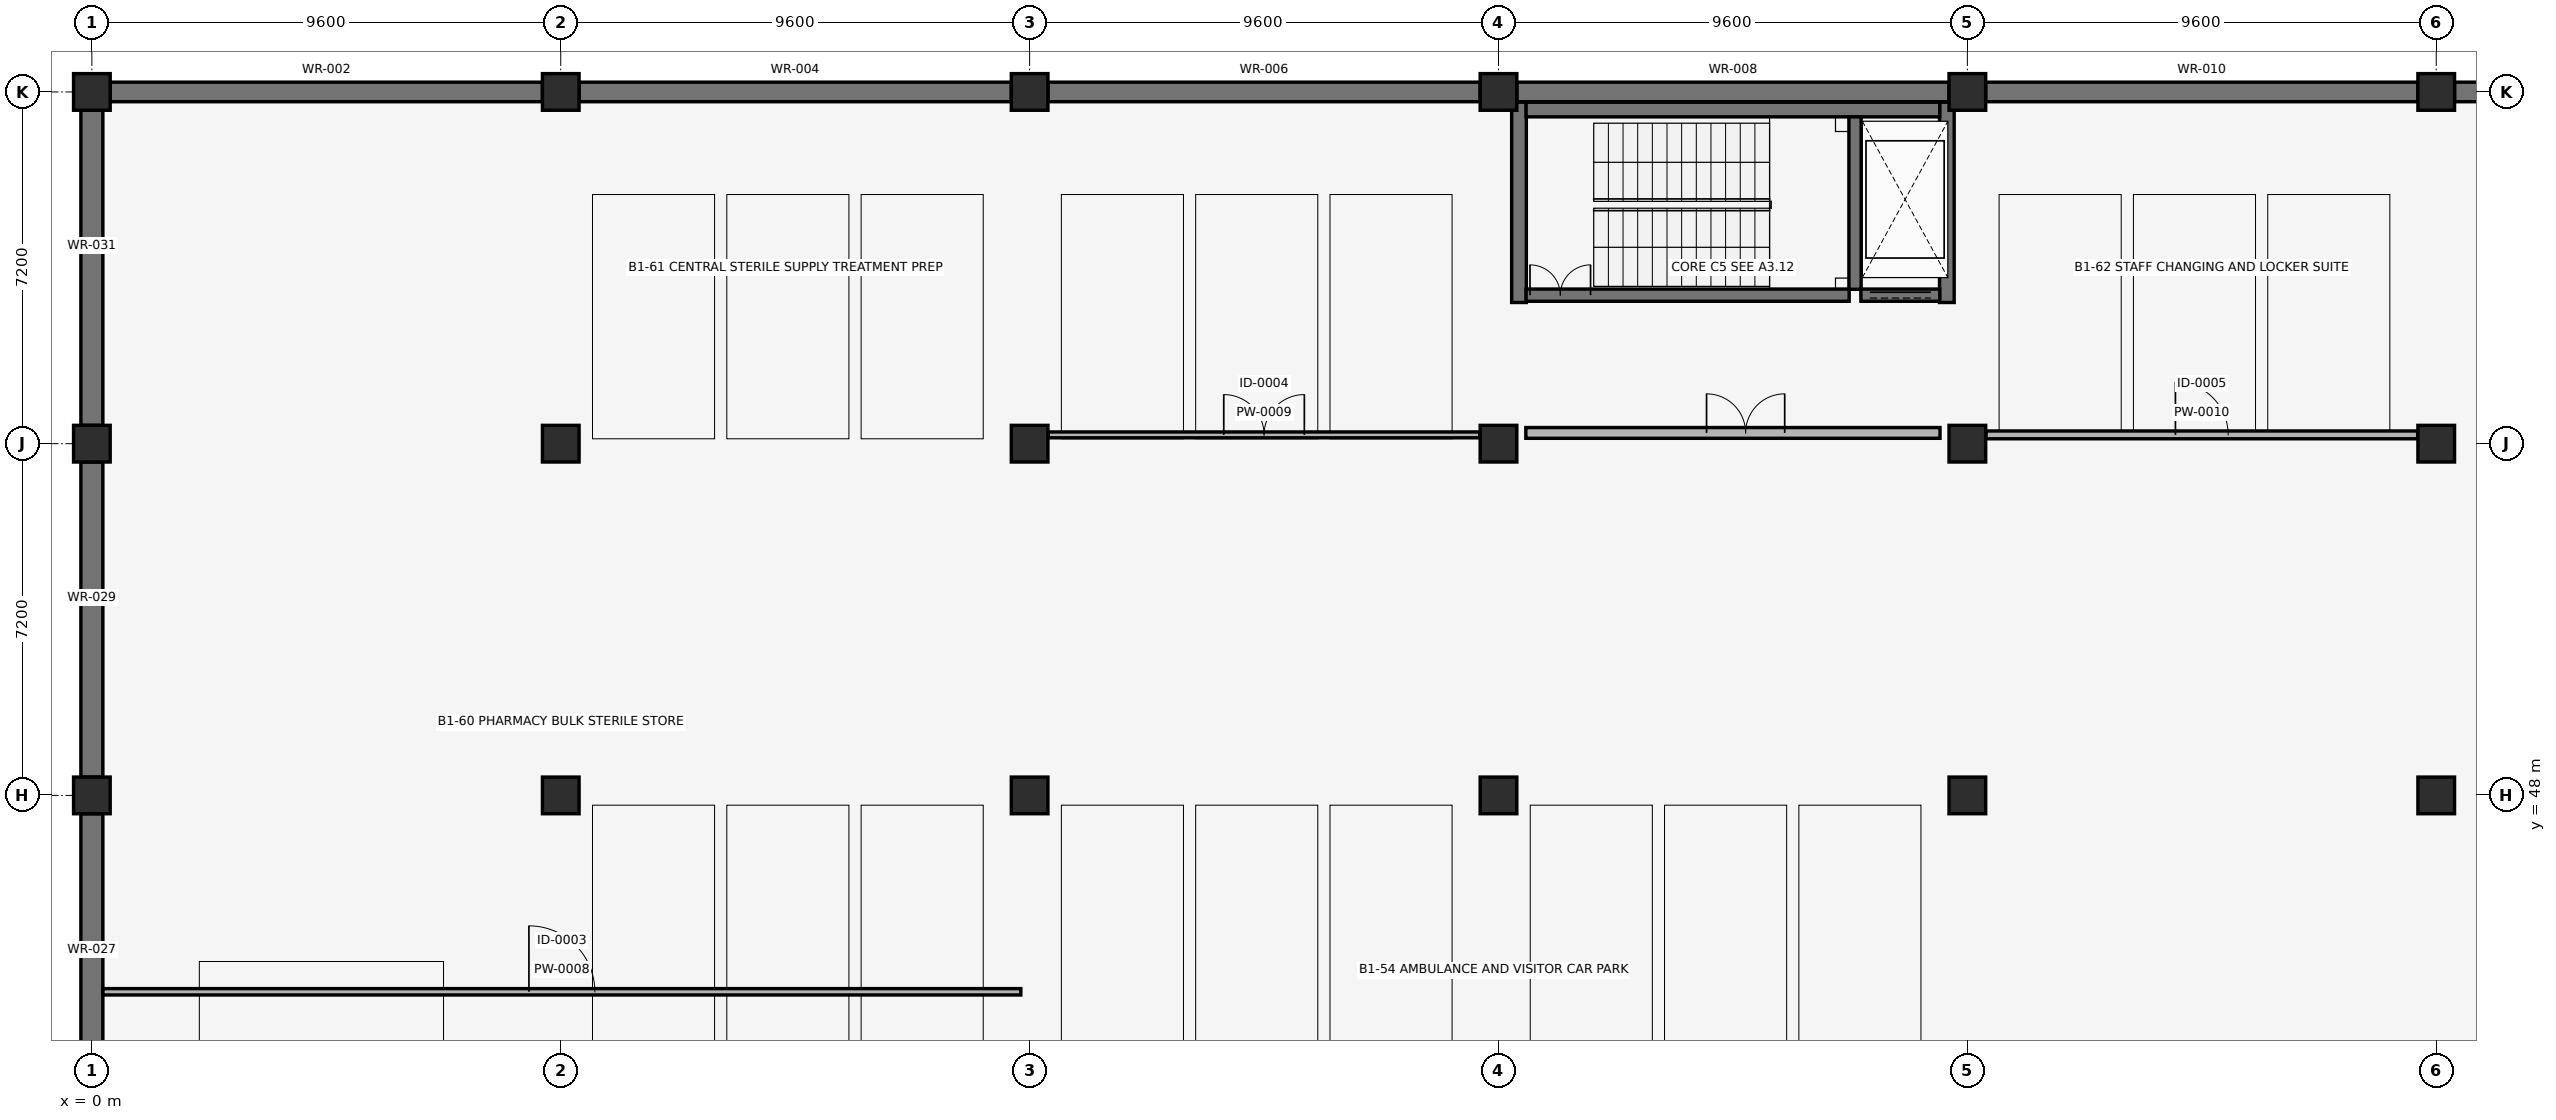
"""IFC4 building model, lengths in metres.
Left out: names, types, materials, properties, quantities, classifications, styles, units other than length and angle.
Written with IfcOpenShell. Run it as: python <this file> out.ifc"""

import sys

from ifc_helpers import new_model, si_unit, direction, frame, frame_2d, origin, origin_2d, place, context, subcontext, project, spatial, rectangle, extrude, element, fill, save


model = new_model("IFC4")
c1 = context("Model", 3, precision=1e-05, world=origin(), true_north=direction((0.0, 1.0)))
c2 = subcontext(c1, "Body", "Model", "MODEL_VIEW")
j1 = project(units=[si_unit("LENGTHUNIT", "METRE"), si_unit("PLANEANGLEUNIT", "RADIAN")], contexts=[c1])
p1 = place(None, origin())
s1 = spatial("IfcSite", under=j1, at=p1, CompositionType="ELEMENT")
p2 = place(p1, origin())
s2 = spatial("IfcBuilding", under=s1, at=p2, CompositionType="ELEMENT")
p3 = place(p2, frame((0.0, 0.0, -4.42)))
s3 = spatial("IfcBuildingStorey", under=s2, at=p3, CompositionType="ELEMENT", Elevation=-4.42)
for number, where, z_axis, x_axis in (
    (1, (0.0, 48.0, 0.0), (0.0, 0.0, 1.0), (1.0, 0.0, 0.0)),
    (2, (0.0, 55.2, 0.0), (0.0, 0.0, 1.0), (1.0, 0.0, 0.0)),
    (3, (0.0, 62.4, 0.0), (0.0, 0.0, 1.0), (1.0, 0.0, 0.0)),
    (4, (9.6, 48.0, 0.0), (0.0, 0.0, 1.0), (1.0, 0.0, 0.0)),
    (5, (9.6, 55.2, 0.0), (0.0, 0.0, 1.0), (1.0, 0.0, 0.0)),
    (6, (9.6, 62.4, 0.0), (0.0, 0.0, 1.0), (1.0, 0.0, 0.0)),
    (7, (19.2, 48.0, 0.0), (0.0, 0.0, 1.0), (1.0, 0.0, 0.0)),
    (8, (19.2, 55.2, 0.0), (0.0, 0.0, 1.0), (1.0, 0.0, 0.0)),
    (9, (19.2, 62.4, 0.0), (0.0, 0.0, 1.0), (1.0, 0.0, 0.0)),
    (10, (28.8, 48.0, 0.0), (0.0, 0.0, 1.0), (1.0, 0.0, 0.0)),
    (11, (28.8, 55.2, 0.0), (0.0, 0.0, 1.0), (1.0, 0.0, 0.0)),
    (12, (28.8, 62.4, 0.0), (0.0, 0.0, 1.0), (1.0, 0.0, 0.0)),
    (13, (38.4, 48.0, 0.0), (0.0, 0.0, 1.0), (1.0, 0.0, 0.0)),
    (14, (38.4, 55.2, 0.0), (0.0, 0.0, 1.0), (1.0, 0.0, 0.0)),
    (15, (38.4, 62.4, 0.0), (0.0, 0.0, 1.0), (1.0, 0.0, 0.0)),
    (16, (48.0, 48.0, 0.0), (0.0, 0.0, 1.0), (1.0, 0.0, 0.0)),
    (17, (48.0, 55.2, 0.0), (0.0, 0.0, 1.0), (1.0, 0.0, 0.0)),
    (18, (48.0, 62.4, 0.0), (0.0, 0.0, 1.0), (1.0, 0.0, 0.0)),
):
    element("IfcColumn", number, at=place(p3, frame(where, z_axis=z_axis, x_axis=x_axis)), inside=s3, PredefinedType="COLUMN", context=c2, shape_type="SweptSolid", body=[
        extrude(rectangle(XDim=0.75, YDim=0.75, at=origin_2d()), origin(), (0.0, 0.0, 1.0), 4.42),
    ])
p4 = place(p3, frame((0.375, 62.4, 0.0), z_axis=(0.0, 0.0, 1.0), x_axis=(1.0, 0.0, 0.0)))
e19 = element("IfcWall", 19, at=p4, inside=s3, PredefinedType="USERDEFINED", context=c2, shape_type="SweptSolid", body=[
    extrude(rectangle(XDim=8.85, YDim=0.4, at=frame_2d((4.425, 0.0))), origin(), (0.0, 0.0, 1.0), 3.27),
])
p5 = place(p3, frame((9.975, 62.4, 0.0), z_axis=(0.0, 0.0, 1.0), x_axis=(1.0, 0.0, 0.0)))
e20 = element("IfcWall", 20, at=p5, inside=s3, PredefinedType="USERDEFINED", context=c2, shape_type="SweptSolid", body=[
    extrude(rectangle(XDim=8.85, YDim=0.4, at=frame_2d((4.425, 0.0))), origin(), (0.0, 0.0, 1.0), 3.27),
])
p6 = place(p3, frame((19.575, 62.4, 0.0), z_axis=(0.0, 0.0, 1.0), x_axis=(1.0, 0.0, 0.0)))
e21 = element("IfcWall", 21, at=p6, inside=s3, PredefinedType="USERDEFINED", context=c2, shape_type="SweptSolid", body=[
    extrude(rectangle(XDim=8.85, YDim=0.4, at=frame_2d((4.425, 0.0))), origin(), (0.0, 0.0, 1.0), 3.27),
])
p7 = place(p3, frame((29.175, 62.4, 0.0), z_axis=(0.0, 0.0, 1.0), x_axis=(1.0, 0.0, 0.0)))
e22 = element("IfcWall", 22, at=p7, inside=s3, PredefinedType="USERDEFINED", context=c2, shape_type="SweptSolid", body=[
    extrude(rectangle(XDim=8.85, YDim=0.4, at=frame_2d((4.425, 0.0))), origin(), (0.0, 0.0, 1.0), 3.27),
])
for number, where, z_axis, x_axis in (
    (23, (38.775, 62.4, 0.0), (0.0, 0.0, 1.0), (1.0, 0.0, 0.0)),
    (24, (48.375, 62.4, 0.0), (0.0, 0.0, 1.0), (1.0, 0.0, 0.0)),
):
    element("IfcWall", number, at=place(p3, frame(where, z_axis=z_axis, x_axis=x_axis)), inside=s3, PredefinedType="USERDEFINED", context=c2, shape_type="SweptSolid", body=[
        extrude(rectangle(XDim=8.85, YDim=0.4, at=frame_2d((4.425, 0.0))), origin(), (0.0, 0.0, 1.0), 3.27),
    ])
for number, where, z_axis, x_axis in (
    (25, (0.0, 41.175, 0.0), (0.0, 0.0, 1.0), (0.0, 1.0, 0.0)),
    (26, (0.0, 48.375, 0.0), (0.0, 0.0, 1.0), (0.0, 1.0, 0.0)),
    (27, (0.0, 55.575, 0.0), (0.0, 0.0, 1.0), (0.0, 1.0, 0.0)),
):
    element("IfcWall", number, at=place(p3, frame(where, z_axis=z_axis, x_axis=x_axis)), inside=s3, PredefinedType="USERDEFINED", context=c2, shape_type="SweptSolid", body=[
        extrude(rectangle(XDim=6.45, YDim=0.45, at=frame_2d((3.225, 0.0))), origin(), (0.0, 0.0, 1.0), 3.27),
    ])
for number, where, z_axis, x_axis in (
    (28, (29.22, 58.09, 0.0), (0.0, 0.0, 1.0), (0.0, 1.0, 0.0)),
    (29, (37.98, 58.09, 0.0), (0.0, 0.0, 1.0), (0.0, 1.0, 0.0)),
):
    element("IfcWall", number, at=place(p3, frame(where, z_axis=z_axis, x_axis=x_axis)), inside=s3, PredefinedType="SHEAR", context=c2, shape_type="SweptSolid", body=[
        extrude(rectangle(XDim=4.1, YDim=0.3, at=frame_2d((2.05, 0.0))), origin(), (0.0, 0.0, 1.0), 4.1),
    ])
p8 = place(p3, frame((29.365, 62.04, 0.0), z_axis=(0.0, 0.0, 1.0), x_axis=(1.0, 0.0, 0.0)))
e30 = element("IfcWall", 30, at=p8, inside=s3, PredefinedType="SHEAR", context=c2, shape_type="SweptSolid", body=[
    extrude(rectangle(XDim=8.47, YDim=0.3, at=frame_2d((4.235, 0.0))), origin(), (0.0, 0.0, 1.0), 4.1),
])
p9 = place(p3, frame((36.1, 58.36, 0.0), z_axis=(0.0, 0.0, 1.0), x_axis=(0.0, 1.0, 0.0)))
e31 = element("IfcWall", 31, at=p9, inside=s3, PredefinedType="SHEAR", context=c2, shape_type="SweptSolid", body=[
    extrude(rectangle(XDim=3.53, YDim=0.25, at=frame_2d((1.765, 0.0))), origin(), (0.0, 0.0, 1.0), 4.1),
])
p10 = place(p3, frame((29.365, 58.24, 0.0), z_axis=(0.0, 0.0, 1.0), x_axis=(1.0, 0.0, 0.0)))
e32 = element("IfcWall", 32, at=p10, inside=s3, PredefinedType="SHEAR", context=c2, shape_type="SweptSolid", body=[
    extrude(rectangle(XDim=6.615, YDim=0.25, at=frame_2d((3.308, 0.0))), origin(), (0.0, 0.0, 1.0), 4.1),
])
p11 = place(p10, frame((0.08, 0.0, 0.0)))
e33 = element("IfcOpeningElement", 33, at=p11, cuts=e32, PredefinedType="OPENING", context=c2, shape_type="SweptSolid", body=[
    extrude(rectangle(XDim=1.24, YDim=2.15, at=frame_2d((0.62, 1.075))), frame((0.0, 0.135, 0.0), z_axis=(0.0, -1.0, 0.0), x_axis=(1.0, 0.0, 0.0)), (0.0, 0.0, 1.0), 0.27),
])
p12 = place(p3, frame((29.36, 55.42, 0.0), z_axis=(0.0, 0.0, 1.0), x_axis=(1.0, 0.0, 0.0)))
e34 = element("IfcWall", 34, at=p12, inside=s3, PredefinedType="PARTITIONING", context=c2, shape_type="SweptSolid", body=[
    extrude(rectangle(XDim=8.48, YDim=0.22, at=frame_2d((4.24, 0.0))), origin(), (0.0, 0.0, 1.0), 3.45),
])
p13 = place(p12, frame((3.7, 0.0, 0.0)))
e35 = element("IfcOpeningElement", 35, at=p13, cuts=e34, PredefinedType="OPENING", context=c2, shape_type="SweptSolid", body=[
    extrude(rectangle(XDim=1.6, YDim=2.2, at=frame_2d((0.8, 1.1))), frame((0.0, 0.12, 0.0), z_axis=(0.0, -1.0, 0.0), x_axis=(1.0, 0.0, 0.0)), (0.0, 0.0, 1.0), 0.24),
])
p14 = place(p3, frame((36.22, 58.24, 0.0), z_axis=(0.0, 0.0, 1.0), x_axis=(1.0, 0.0, 0.0)))
e36 = element("IfcWall", 36, at=p14, inside=s3, PredefinedType="SHEAR", context=c2, shape_type="SweptSolid", body=[
    extrude(rectangle(XDim=1.615, YDim=0.25, at=frame_2d((0.808, 0.0))), origin(), (0.0, 0.0, 1.0), 4.1),
])
p15 = place(p14, frame((0.183, 0.0, 0.0)))
e37 = element("IfcOpeningElement", 37, at=p15, cuts=e36, PredefinedType="OPENING", context=c2, shape_type="SweptSolid", body=[
    extrude(rectangle(XDim=1.25, YDim=2.15, at=frame_2d((0.625, 1.075))), frame((0.0, 0.135, 0.0), z_axis=(0.0, -1.0, 0.0), x_axis=(1.0, 0.0, 0.0)), (0.0, 0.0, 1.0), 0.27),
])
p16 = place(p3, frame((0.227, 43.98, 0.0), z_axis=(0.0, 0.0, 1.0), x_axis=(1.0, 0.0, 0.0)))
e38 = element("IfcWall", 38, at=p16, inside=s3, PredefinedType="PARTITIONING", context=c2, shape_type="SweptSolid", body=[
    extrude(rectangle(XDim=18.793, YDim=0.13, at=frame_2d((9.396, 0.0))), origin(), (0.0, 0.0, 1.0), 3.46),
])
p17 = place(p16, frame((8.721, 0.0, 0.0)))
e39 = element("IfcOpeningElement", 39, at=p17, cuts=e38, PredefinedType="OPENING", context=c2, shape_type="SweptSolid", body=[
    extrude(rectangle(XDim=1.35, YDim=2.12, at=frame_2d((0.675, 1.06))), frame((0.0, 0.075, 0.0), z_axis=(0.0, -1.0, 0.0), x_axis=(1.0, 0.0, 0.0)), (0.0, 0.0, 1.0), 0.15),
])
p18 = place(p3, frame((19.58, 55.38, 0.0), z_axis=(0.0, 0.0, 1.0), x_axis=(1.0, 0.0, 0.0)))
e40 = element("IfcWall", 40, at=p18, inside=s3, PredefinedType="PARTITIONING", context=c2, shape_type="SweptSolid", body=[
    extrude(rectangle(XDim=8.84, YDim=0.12, at=frame_2d((4.42, 0.0))), origin(), (0.0, 0.0, 1.0), 3.45),
])
p19 = place(p18, frame((3.595, 0.0, 0.0)))
e41 = element("IfcOpeningElement", 41, at=p19, cuts=e40, PredefinedType="OPENING", context=c2, shape_type="SweptSolid", body=[
    extrude(rectangle(XDim=1.65, YDim=2.15, at=frame_2d((0.825, 1.075))), frame((0.0, 0.07, 0.0), z_axis=(0.0, -1.0, 0.0), x_axis=(1.0, 0.0, 0.0)), (0.0, 0.0, 1.0), 0.14),
])
p20 = place(p3, frame((38.78, 55.38, 0.0), z_axis=(0.0, 0.0, 1.0), x_axis=(1.0, 0.0, 0.0)))
e42 = element("IfcWall", 42, at=p20, inside=s3, PredefinedType="PARTITIONING", context=c2, shape_type="SweptSolid", body=[
    extrude(rectangle(XDim=8.84, YDim=0.16, at=frame_2d((4.42, 0.0))), origin(), (0.0, 0.0, 1.0), 3.45),
])
p21 = place(p20, frame((3.88, 0.0, 0.0)))
e43 = element("IfcOpeningElement", 43, at=p21, cuts=e42, PredefinedType="OPENING", context=c2, shape_type="SweptSolid", body=[
    extrude(rectangle(XDim=1.08, YDim=2.1, at=frame_2d((0.54, 1.05))), frame((0.0, 0.09, 0.0), z_axis=(0.0, -1.0, 0.0), x_axis=(1.0, 0.0, 0.0)), (0.0, 0.0, 1.0), 0.18),
])
p22 = place(p11, origin())
e44 = element("IfcDoor", 44, at=p22, inside=s3, OperationType="DOUBLE_DOOR_SINGLE_SWING", PredefinedType="DOOR", context=c2, shape_type="SweptSolid", body=[
    extrude(rectangle(XDim=1.24, YDim=2.15, at=frame_2d((0.62, 1.075))), frame((0.0, 0.025, 0.0), z_axis=(0.0, -1.0, 0.0), x_axis=(1.0, 0.0, 0.0)), (0.0, 0.0, 1.0), 0.05),
])
fill(e33, e44)
p23 = place(p13, origin())
e45 = element("IfcDoor", 45, at=p23, inside=s3, OperationType="DOUBLE_DOOR_SINGLE_SWING", PredefinedType="DOOR", context=c2, shape_type="SweptSolid", body=[
    extrude(rectangle(XDim=1.6, YDim=2.2, at=frame_2d((0.8, 1.1))), frame((0.0, 0.025, 0.0), z_axis=(0.0, -1.0, 0.0), x_axis=(1.0, 0.0, 0.0)), (0.0, 0.0, 1.0), 0.05),
])
fill(e35, e45)
p24 = place(p15, origin())
e46 = element("IfcDoor", 46, at=p24, inside=s3, OperationType="DOUBLE_DOOR_SLIDING", PredefinedType="DOOR", context=c2, shape_type="SweptSolid", body=[
    extrude(rectangle(XDim=1.25, YDim=2.15, at=frame_2d((0.625, 1.075))), frame((0.0, 0.025, 0.0), z_axis=(0.0, -1.0, 0.0), x_axis=(1.0, 0.0, 0.0)), (0.0, 0.0, 1.0), 0.05),
])
fill(e37, e46)
p25 = place(p17, origin())
e47 = element("IfcDoor", 47, at=p25, inside=s3, OperationType="SINGLE_SWING_LEFT", PredefinedType="DOOR", context=c2, shape_type="SweptSolid", body=[
    extrude(rectangle(XDim=1.35, YDim=2.12, at=frame_2d((0.675, 1.06))), frame((0.0, 0.025, 0.0), z_axis=(0.0, -1.0, 0.0), x_axis=(1.0, 0.0, 0.0)), (0.0, 0.0, 1.0), 0.05),
])
fill(e39, e47)
p26 = place(p19, origin())
e48 = element("IfcDoor", 48, at=p26, inside=s3, OperationType="DOUBLE_DOOR_SINGLE_SWING", PredefinedType="DOOR", context=c2, shape_type="SweptSolid", body=[
    extrude(rectangle(XDim=1.65, YDim=2.15, at=frame_2d((0.825, 1.075))), frame((0.0, 0.025, 0.0), z_axis=(0.0, -1.0, 0.0), x_axis=(1.0, 0.0, 0.0)), (0.0, 0.0, 1.0), 0.05),
])
fill(e41, e48)
p27 = place(p21, origin())
e49 = element("IfcDoor", 49, at=p27, inside=s3, OperationType="SINGLE_SWING_LEFT", PredefinedType="DOOR", context=c2, shape_type="SweptSolid", body=[
    extrude(rectangle(XDim=1.08, YDim=2.1, at=frame_2d((0.54, 1.05))), frame((0.0, 0.025, 0.0), z_axis=(0.0, -1.0, 0.0), x_axis=(1.0, 0.0, 0.0)), (0.0, 0.0, 1.0), 0.05),
])
fill(e43, e49)
save(model, sys.argv[1])
